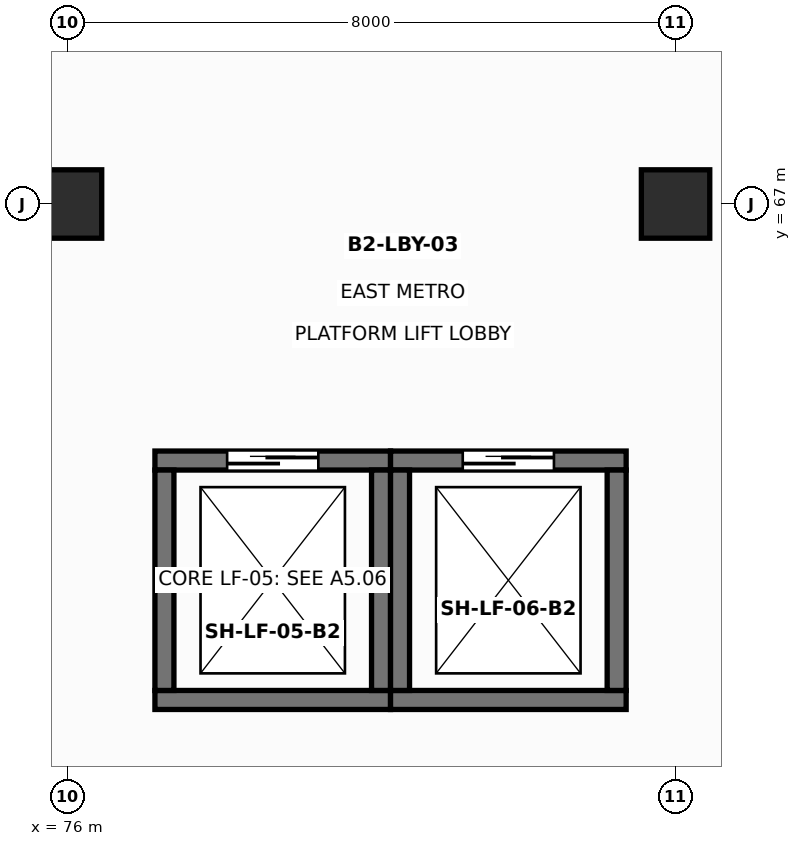
"""IFC4 building model, lengths in metres.
Left out: names, types, materials, properties, quantities, classifications, styles, units other than length and angle.
Written with IfcOpenShell. Run it as: python <this file> out.ifc"""

import sys

from ifc_helpers import new_model, si_unit, direction, frame, frame_2d, origin, origin_2d, place, context, subcontext, project, spatial, rectangle, extrude, element, fill, save


model = new_model("IFC4")
c1 = context("Model", 3, precision=1e-05, world=origin(), true_north=direction((0.0, 1.0)))
c2 = subcontext(c1, "Body", "Model", "MODEL_VIEW")
j1 = project(units=[si_unit("LENGTHUNIT", "METRE"), si_unit("PLANEANGLEUNIT", "RADIAN")], contexts=[c1])
p1 = place(None, origin())
s1 = spatial("IfcSite", under=j1, at=p1, CompositionType="ELEMENT")
p2 = place(p1, origin())
s2 = spatial("IfcBuilding", under=s1, at=p2, CompositionType="ELEMENT")
p3 = place(p2, frame((0.0, 0.0, -11.2)))
s3 = spatial("IfcBuildingStorey", under=s2, at=p3, CompositionType="ELEMENT", Elevation=-11.2)
for number, where, z_axis, x_axis in (
    (1, (76.0, 67.0, 0.0), (0.0, 0.0, 1.0), (1.0, 0.0, 0.0)),
    (2, (84.0, 67.0, 0.0), (0.0, 0.0, 1.0), (1.0, 0.0, 0.0)),
):
    element("IfcColumn", number, at=place(p3, frame(where, z_axis=z_axis, x_axis=x_axis)), inside=s3, PredefinedType="COLUMN", context=c2, shape_type="SweptSolid", body=[
        extrude(rectangle(XDim=0.9, YDim=0.9, at=origin_2d()), origin(), (0.0, 0.0, 1.0), 5.6),
    ])
p4 = place(p3, frame((77.15, 60.475, 0.0), z_axis=(0.0, 0.0, 1.0), x_axis=(1.0, 0.0, 0.0)))
e3 = element("IfcWall", 3, at=p4, inside=s3, PredefinedType="SOLIDWALL", context=c2, shape_type="SweptSolid", body=[
    extrude(rectangle(XDim=3.1, YDim=0.25, at=frame_2d((1.55, 0.0))), origin(), (0.0, 0.0, 1.0), 5.235),
])
p5 = place(p3, frame((80.25, 63.625, 0.0), z_axis=(0.0, 0.0, 1.0), x_axis=(-1.0, 0.0, 0.0)))
e4 = element("IfcWall", 4, at=p5, inside=s3, PredefinedType="SOLIDWALL", context=c2, shape_type="SweptSolid", body=[
    extrude(rectangle(XDim=3.1, YDim=0.25, at=frame_2d((1.55, 0.0))), origin(), (0.0, 0.0, 1.0), 5.235),
])
p6 = place(p5, frame((0.95, 0.0, 0.0)))
e5 = element("IfcOpeningElement", 5, at=p6, cuts=e4, PredefinedType="OPENING", context=c2, shape_type="SweptSolid", body=[
    extrude(rectangle(XDim=1.2, YDim=2.2, at=frame_2d((0.6, 1.1))), frame((0.0, 0.135, 0.0), z_axis=(0.0, -1.0, 0.0), x_axis=(1.0, 0.0, 0.0)), (0.0, 0.0, 1.0), 0.27),
])
for number, where, z_axis, x_axis in (
    (6, (80.125, 60.6, 0.0), (0.0, 0.0, 1.0), (0.0, 1.0, 0.0)),
    (7, (77.275, 63.5, 0.0), (0.0, 0.0, 1.0), (0.0, -1.0, 0.0)),
):
    element("IfcWall", number, at=place(p3, frame(where, z_axis=z_axis, x_axis=x_axis)), inside=s3, PredefinedType="SOLIDWALL", context=c2, shape_type="SweptSolid", body=[
        extrude(rectangle(XDim=2.9, YDim=0.25, at=frame_2d((1.45, 0.0))), origin(), (0.0, 0.0, 1.0), 5.235),
    ])
p7 = place(p3, frame((80.25, 60.475, 0.0), z_axis=(0.0, 0.0, 1.0), x_axis=(1.0, 0.0, 0.0)))
e8 = element("IfcWall", 8, at=p7, inside=s3, PredefinedType="SOLIDWALL", context=c2, shape_type="SweptSolid", body=[
    extrude(rectangle(XDim=3.1, YDim=0.25, at=frame_2d((1.55, 0.0))), origin(), (0.0, 0.0, 1.0), 5.235),
])
p8 = place(p3, frame((83.35, 63.625, 0.0), z_axis=(0.0, 0.0, 1.0), x_axis=(-1.0, 0.0, 0.0)))
e9 = element("IfcWall", 9, at=p8, inside=s3, PredefinedType="SOLIDWALL", context=c2, shape_type="SweptSolid", body=[
    extrude(rectangle(XDim=3.1, YDim=0.25, at=frame_2d((1.55, 0.0))), origin(), (0.0, 0.0, 1.0), 5.235),
])
p9 = place(p8, frame((0.95, 0.0, 0.0)))
e10 = element("IfcOpeningElement", 10, at=p9, cuts=e9, PredefinedType="OPENING", context=c2, shape_type="SweptSolid", body=[
    extrude(rectangle(XDim=1.2, YDim=2.2, at=frame_2d((0.6, 1.1))), frame((0.0, 0.135, 0.0), z_axis=(0.0, -1.0, 0.0), x_axis=(1.0, 0.0, 0.0)), (0.0, 0.0, 1.0), 0.27),
])
for number, where, z_axis, x_axis in (
    (11, (83.225, 60.6, 0.0), (0.0, 0.0, 1.0), (0.0, 1.0, 0.0)),
    (12, (80.375, 63.5, 0.0), (0.0, 0.0, 1.0), (0.0, -1.0, 0.0)),
):
    element("IfcWall", number, at=place(p3, frame(where, z_axis=z_axis, x_axis=x_axis)), inside=s3, PredefinedType="SOLIDWALL", context=c2, shape_type="SweptSolid", body=[
        extrude(rectangle(XDim=2.9, YDim=0.25, at=frame_2d((1.45, 0.0))), origin(), (0.0, 0.0, 1.0), 5.235),
    ])
p10 = place(p6, frame((1.2, 0.0, 0.0), z_axis=(0.0, 0.0, 1.0), x_axis=(-1.0, 0.0, 0.0)))
e13 = element("IfcDoor", 13, at=p10, inside=s3, OperationType="DOUBLE_DOOR_SLIDING", PredefinedType="DOOR", context=c2, shape_type="SweptSolid", body=[
    extrude(rectangle(XDim=1.2, YDim=2.2, at=frame_2d((0.6, 1.1))), frame((0.0, 0.025, 0.0), z_axis=(0.0, -1.0, 0.0), x_axis=(1.0, 0.0, 0.0)), (0.0, 0.0, 1.0), 0.05),
])
fill(e5, e13)
p11 = place(p9, frame((1.2, 0.0, 0.0), z_axis=(0.0, 0.0, 1.0), x_axis=(-1.0, 0.0, 0.0)))
e14 = element("IfcDoor", 14, at=p11, inside=s3, OperationType="DOUBLE_DOOR_SLIDING", PredefinedType="DOOR", context=c2, shape_type="SweptSolid", body=[
    extrude(rectangle(XDim=1.2, YDim=2.2, at=frame_2d((0.6, 1.1))), frame((0.0, 0.025, 0.0), z_axis=(0.0, -1.0, 0.0), x_axis=(1.0, 0.0, 0.0)), (0.0, 0.0, 1.0), 0.05),
])
fill(e10, e14)
save(model, sys.argv[1])
